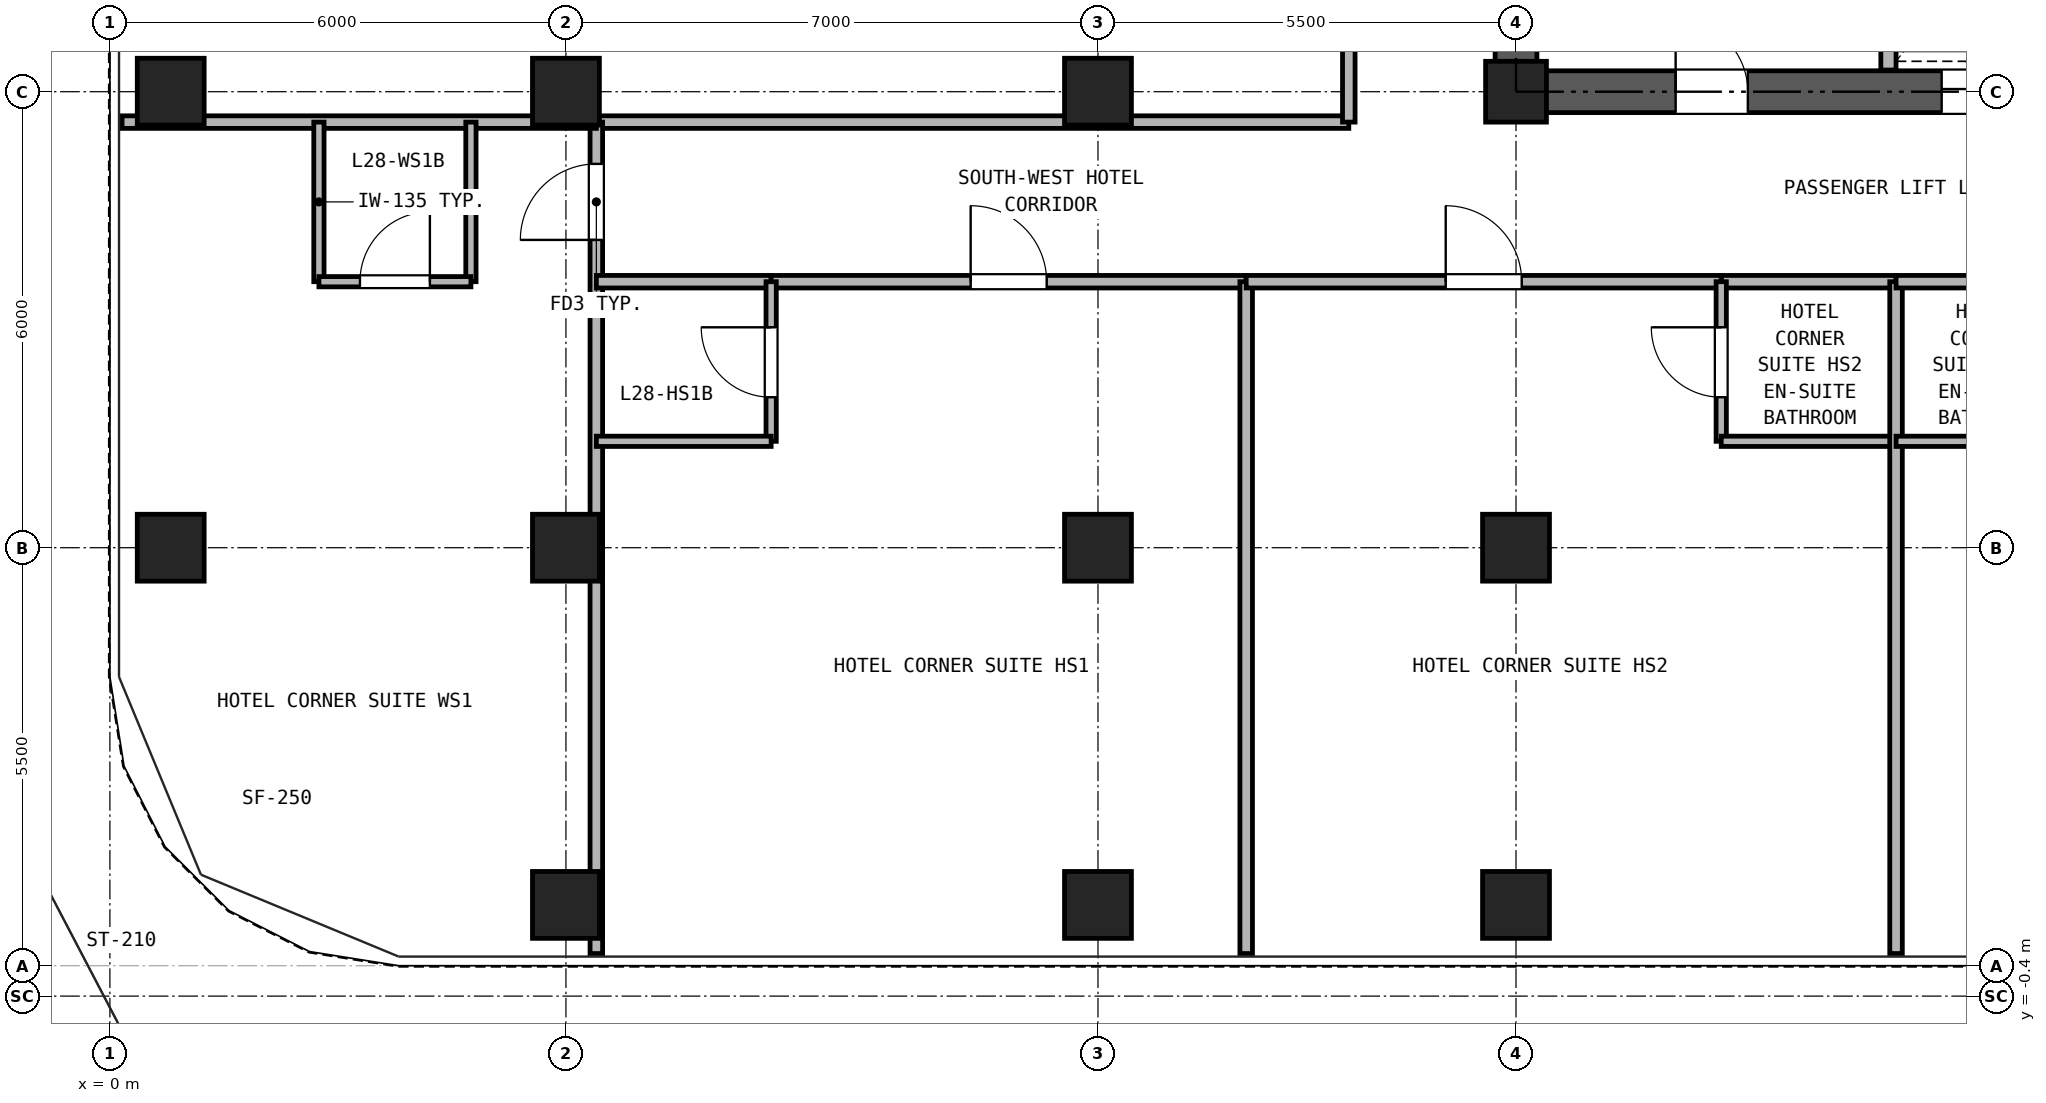
"""IFC4 building model, lengths in metres.
Left out: names, types, materials, properties, quantities, classifications, styles, units other than length and angle.
Written with IfcOpenShell. Run it as: python <this file> out.ifc"""

import sys

from ifc_helpers import new_model, si_unit, direction, frame, frame_2d, origin, origin_2d, place, context, subcontext, project, spatial, rectangle, hollow_rectangle, extrude, source, transform, mapped, element, fill, save


model = new_model("IFC4")
c1 = context("Model", 3, precision=1e-05, world=origin(), true_north=direction((0.0, 1.0)))
c2 = subcontext(c1, "Body", "Model", "MODEL_VIEW")
j1 = project(units=[si_unit("LENGTHUNIT", "METRE"), si_unit("PLANEANGLEUNIT", "RADIAN")], contexts=[c1])
p1 = place(None, origin())
s1 = spatial("IfcSite", under=j1, at=p1, CompositionType="ELEMENT")
p2 = place(p1, origin())
s2 = spatial("IfcBuilding", under=s1, at=p2, CompositionType="ELEMENT")
p3 = place(p2, frame((0.0, 0.0, 105.5)))
s3 = spatial("IfcBuildingStorey", under=s2, at=p3, CompositionType="ELEMENT", Elevation=105.5)
m1 = source(origin(), c2, "Body", "SweptSolid", [
    extrude(hollow_rectangle(XDim=0.88, YDim=0.88, WallThickness=0.05, at=origin_2d()), origin(), (0.0, 0.0, 1.0), 2.95),
])
for number, where, z_axis, x_axis in (
    (1, (6.0, 0.8, 0.0), (0.0, 0.0, 1.0), (1.0, 0.0, 0.0)),
    (2, (13.0, 0.8, 0.0), (0.0, 0.0, 1.0), (1.0, 0.0, 0.0)),
    (3, (18.5, 0.8, 0.0), (0.0, 0.0, 1.0), (1.0, 0.0, 0.0)),
    (4, (0.8, 5.5, 0.0), (0.0, 0.0, 1.0), (1.0, 0.0, 0.0)),
    (5, (0.8, 11.5, 0.0), (0.0, 0.0, 1.0), (1.0, 0.0, 0.0)),
    (6, (6.0, 5.5, 0.0), (0.0, 0.0, 1.0), (1.0, 0.0, 0.0)),
    (7, (6.0, 11.5, 0.0), (0.0, 0.0, 1.0), (1.0, 0.0, 0.0)),
    (8, (13.0, 5.5, 0.0), (0.0, 0.0, 1.0), (1.0, 0.0, 0.0)),
    (9, (13.0, 11.5, 0.0), (0.0, 0.0, 1.0), (1.0, 0.0, 0.0)),
    (10, (18.5, 5.5, 0.0), (0.0, 0.0, 1.0), (1.0, 0.0, 0.0)),
):
    element("IfcColumn", number, at=place(p3, frame(where, z_axis=z_axis, x_axis=x_axis)), inside=s3, PredefinedType="COLUMN", context=c2, shape_type="MappedRepresentation", body=[
        mapped(m1, transform((0.0, 0.0, 0.0), x_axis=(1.0, 0.0, 0.0), y_axis=(0.0, 1.0, 0.0), z_axis=(0.0, 0.0, 1.0), scale=1.0)),
    ])
m2 = source(origin(), c2, "Body", "SweptSolid", [
    extrude(hollow_rectangle(XDim=0.8, YDim=0.8, WallThickness=0.045, at=origin_2d()), origin(), (0.0, 0.0, 1.0), 2.95),
])
p4 = place(p3, frame((18.5, 11.5, 0.0), z_axis=(0.0, 0.0, 1.0), x_axis=(1.0, 0.0, 0.0)))
e11 = element("IfcColumn", 11, at=p4, inside=s3, PredefinedType="COLUMN", context=c2, shape_type="MappedRepresentation", body=[
    mapped(m2, transform((0.0, 0.0, 0.0), x_axis=(1.0, 0.0, 0.0), y_axis=(0.0, 1.0, 0.0), z_axis=(0.0, 0.0, 1.0), scale=1.0)),
])
p5 = place(p3, frame((18.225, 11.5, 0.0), z_axis=(0.0, 0.0, 1.0), x_axis=(1.0, 0.0, 0.0)))
e12 = element("IfcWall", 12, at=p5, inside=s3, PredefinedType="SHEAR", context=c2, shape_type="SweptSolid", body=[
    extrude(rectangle(XDim=10.55, YDim=0.55, at=frame_2d((5.275, 0.0))), origin(), (0.0, 0.0, 1.0), 2.95),
])
p6 = place(p5, frame((2.375, 0.0, 0.0)))
e13 = element("IfcOpeningElement", 13, at=p6, cuts=e12, PredefinedType="OPENING", context=c2, shape_type="SweptSolid", body=[
    extrude(rectangle(XDim=0.95, YDim=2.15, at=frame_2d((0.475, 1.075))), frame((0.0, 0.285, 0.0), z_axis=(0.0, -1.0, 0.0), x_axis=(1.0, 0.0, 0.0)), (0.0, 0.0, 1.0), 0.57),
])
p7 = place(p5, frame((5.875, 0.0, 0.0)))
e14 = element("IfcOpeningElement", 14, at=p7, cuts=e12, PredefinedType="OPENING", context=c2, shape_type="SweptSolid", body=[
    extrude(rectangle(XDim=1.1, YDim=2.25, at=frame_2d((0.55, 1.125))), frame((0.0, 0.285, 0.0), z_axis=(0.0, -1.0, 0.0), x_axis=(1.0, 0.0, 0.0)), (0.0, 0.0, 1.0), 0.57),
])
p8 = place(p5, frame((8.275, 0.0, 0.0)))
e15 = element("IfcOpeningElement", 15, at=p8, cuts=e12, PredefinedType="OPENING", context=c2, shape_type="SweptSolid", body=[
    extrude(rectangle(XDim=1.1, YDim=2.25, at=frame_2d((0.55, 1.125))), frame((0.0, 0.285, 0.0), z_axis=(0.0, -1.0, 0.0), x_axis=(1.0, 0.0, 0.0)), (0.0, 0.0, 1.0), 0.57),
])
p9 = place(p3, frame((18.5, 11.775, 0.0), z_axis=(0.0, 0.0, 1.0), x_axis=(0.0, 1.0, 0.0)))
e16 = element("IfcWall", 16, at=p9, inside=s3, PredefinedType="SHEAR", context=c2, shape_type="SweptSolid", body=[
    extrude(rectangle(XDim=16.7, YDim=0.55, at=frame_2d((8.35, 0.0))), origin(), (0.0, 0.0, 1.0), 2.95),
])
p10 = place(p9, frame((7.375, 0.0, 0.0)))
e17 = element("IfcOpeningElement", 17, at=p10, cuts=e16, PredefinedType="OPENING", context=c2, shape_type="SweptSolid", body=[
    extrude(rectangle(XDim=1.15, YDim=2.2, at=frame_2d((0.575, 1.1))), frame((0.0, 0.285, 0.0), z_axis=(0.0, -1.0, 0.0), x_axis=(1.0, 0.0, 0.0)), (0.0, 0.0, 1.0), 0.57),
])
p11 = place(p3, frame((23.4, 11.785, 0.0), z_axis=(0.0, 0.0, 1.0), x_axis=(0.0, 1.0, 0.0)))
e18 = element("IfcWall", 18, at=p11, inside=s3, PredefinedType="PARTITIONING", context=c2, shape_type="SweptSolid", body=[
    extrude(rectangle(XDim=3.215, YDim=0.2, at=frame_2d((1.607, 0.0))), origin(), (0.0, 0.0, 1.0), 2.95),
])
p12 = place(p3, frame((6.4, 11.1, 0.0), z_axis=(0.0, 0.0, 1.0), x_axis=(1.0, 0.0, 0.0)))
e19 = element("IfcWall", 19, at=p12, inside=s3, PredefinedType="PARTITIONING", context=c2, shape_type="SweptSolid", body=[
    extrude(rectangle(XDim=9.9, YDim=0.165, at=frame_2d((4.95, 0.0))), origin(), (0.0, 0.0, 1.0), 2.95),
])
p13 = place(p3, frame((16.3, 11.1, 0.0), z_axis=(0.0, 0.0, 1.0), x_axis=(0.0, 1.0, 0.0)))
e20 = element("IfcWall", 20, at=p13, inside=s3, PredefinedType="PARTITIONING", context=c2, shape_type="SweptSolid", body=[
    extrude(rectangle(XDim=18.45, YDim=0.165, at=frame_2d((9.225, 0.0))), origin(), (0.0, 0.0, 1.0), 2.95),
])
p14 = place(p13, frame((2.5, 0.0, 0.0)))
e21 = element("IfcOpeningElement", 21, at=p14, cuts=e20, PredefinedType="OPENING", context=c2, shape_type="SweptSolid", body=[
    extrude(rectangle(XDim=0.95, YDim=2.15, at=frame_2d((0.475, 1.075))), frame((0.0, 0.093, 0.0), z_axis=(0.0, -1.0, 0.0), x_axis=(1.0, 0.0, 0.0)), (0.0, 0.0, 1.0), 0.185),
])
p15 = place(p13, frame((8.5, 0.0, 0.0)))
e22 = element("IfcOpeningElement", 22, at=p15, cuts=e20, PredefinedType="OPENING", context=c2, shape_type="SweptSolid", body=[
    extrude(rectangle(XDim=0.95, YDim=2.15, at=frame_2d((0.475, 1.075))), frame((0.0, 0.093, 0.0), z_axis=(0.0, -1.0, 0.0), x_axis=(1.0, 0.0, 0.0)), (0.0, 0.0, 1.0), 0.185),
])
p16 = place(p13, frame((14.725, 0.0, 0.0)))
e23 = element("IfcOpeningElement", 23, at=p16, cuts=e20, PredefinedType="OPENING", context=c2, shape_type="SweptSolid", body=[
    extrude(rectangle(XDim=0.95, YDim=2.15, at=frame_2d((0.475, 1.075))), frame((0.0, 0.093, 0.0), z_axis=(0.0, -1.0, 0.0), x_axis=(1.0, 0.0, 0.0)), (0.0, 0.0, 1.0), 0.185),
])
p17 = place(p3, frame((6.4, 0.16, 0.0), z_axis=(0.0, 0.0, 1.0), x_axis=(0.0, 1.0, 0.0)))
e24 = element("IfcWall", 24, at=p17, inside=s3, PredefinedType="PARTITIONING", context=c2, shape_type="SweptSolid", body=[
    extrude(rectangle(XDim=10.94, YDim=0.165, at=frame_2d((5.47, 0.0))), origin(), (0.0, 0.0, 1.0), 2.95),
])
p18 = place(p17, frame((9.39, 0.0, 0.0)))
e25 = element("IfcOpeningElement", 25, at=p18, cuts=e24, PredefinedType="OPENING", context=c2, shape_type="SweptSolid", body=[
    extrude(rectangle(XDim=1.0, YDim=2.15, at=frame_2d((0.5, 1.075))), frame((0.0, 0.093, 0.0), z_axis=(0.0, -1.0, 0.0), x_axis=(1.0, 0.0, 0.0)), (0.0, 0.0, 1.0), 0.185),
])
p19 = place(p3, frame((0.16, 11.1, 0.0), z_axis=(0.0, 0.0, 1.0), x_axis=(1.0, 0.0, 0.0)))
e26 = element("IfcWall", 26, at=p19, inside=s3, PredefinedType="PARTITIONING", context=c2, shape_type="SweptSolid", body=[
    extrude(rectangle(XDim=6.24, YDim=0.165, at=frame_2d((3.12, 0.0))), origin(), (0.0, 0.0, 1.0), 2.95),
])
for number, where, z_axis, x_axis in (
    (27, (2.75, 9.0, 0.0), (0.0, 0.0, 1.0), (0.0, 1.0, 0.0)),
    (28, (4.75, 9.0, 0.0), (0.0, 0.0, 1.0), (0.0, 1.0, 0.0)),
):
    element("IfcWall", number, at=place(p3, frame(where, z_axis=z_axis, x_axis=x_axis)), inside=s3, PredefinedType="PARTITIONING", context=c2, shape_type="SweptSolid", body=[
        extrude(rectangle(XDim=2.1, YDim=0.135, at=frame_2d((1.05, 0.0))), origin(), (0.0, 0.0, 1.0), 2.95),
    ])
p20 = place(p3, frame((2.75, 9.0, 0.0), z_axis=(0.0, 0.0, 1.0), x_axis=(1.0, 0.0, 0.0)))
e29 = element("IfcWall", 29, at=p20, inside=s3, PredefinedType="PARTITIONING", context=c2, shape_type="SweptSolid", body=[
    extrude(rectangle(XDim=2.0, YDim=0.135, at=frame_2d((1.0, 0.0))), origin(), (0.0, 0.0, 1.0), 2.95),
])
p21 = place(p20, frame((0.54, 0.0, 0.0)))
e30 = element("IfcOpeningElement", 30, at=p21, cuts=e29, PredefinedType="OPENING", context=c2, shape_type="SweptSolid", body=[
    extrude(rectangle(XDim=0.92, YDim=2.1, at=frame_2d((0.46, 1.05))), frame((0.0, 0.077, 0.0), z_axis=(0.0, -1.0, 0.0), x_axis=(1.0, 0.0, 0.0)), (0.0, 0.0, 1.0), 0.155),
])
p22 = place(p3, frame((6.4, 9.0, 0.0), z_axis=(0.0, 0.0, 1.0), x_axis=(1.0, 0.0, 0.0)))
e31 = element("IfcWall", 31, at=p22, inside=s3, PredefinedType="PARTITIONING", context=c2, shape_type="SweptSolid", body=[
    extrude(rectangle(XDim=2.3, YDim=0.165, at=frame_2d((1.15, 0.0))), origin(), (0.0, 0.0, 1.0), 2.95),
])
p23 = place(p3, frame((8.7, 9.0, 0.0), z_axis=(0.0, 0.0, 1.0), x_axis=(1.0, 0.0, 0.0)))
e32 = element("IfcWall", 32, at=p23, inside=s3, PredefinedType="PARTITIONING", context=c2, shape_type="SweptSolid", body=[
    extrude(rectangle(XDim=6.25, YDim=0.165, at=frame_2d((3.125, 0.0))), origin(), (0.0, 0.0, 1.0), 2.95),
])
p24 = place(p23, frame((2.625, 0.0, 0.0)))
e33 = element("IfcOpeningElement", 33, at=p24, cuts=e32, PredefinedType="OPENING", context=c2, shape_type="SweptSolid", body=[
    extrude(rectangle(XDim=1.0, YDim=2.15, at=frame_2d((0.5, 1.075))), frame((0.0, 0.093, 0.0), z_axis=(0.0, -1.0, 0.0), x_axis=(1.0, 0.0, 0.0)), (0.0, 0.0, 1.0), 0.185),
])
p25 = place(p3, frame((8.7, 6.9, 0.0), z_axis=(0.0, 0.0, 1.0), x_axis=(0.0, 1.0, 0.0)))
e34 = element("IfcWall", 34, at=p25, inside=s3, PredefinedType="PARTITIONING", context=c2, shape_type="SweptSolid", body=[
    extrude(rectangle(XDim=2.1, YDim=0.135, at=frame_2d((1.05, 0.0))), origin(), (0.0, 0.0, 1.0), 2.95),
])
p26 = place(p25, frame((0.58, 0.0, 0.0)))
e35 = element("IfcOpeningElement", 35, at=p26, cuts=e34, PredefinedType="OPENING", context=c2, shape_type="SweptSolid", body=[
    extrude(rectangle(XDim=0.92, YDim=2.1, at=frame_2d((0.46, 1.05))), frame((0.0, 0.077, 0.0), z_axis=(0.0, -1.0, 0.0), x_axis=(1.0, 0.0, 0.0)), (0.0, 0.0, 1.0), 0.155),
])
p27 = place(p3, frame((6.4, 6.9, 0.0), z_axis=(0.0, 0.0, 1.0), x_axis=(1.0, 0.0, 0.0)))
e36 = element("IfcWall", 36, at=p27, inside=s3, PredefinedType="PARTITIONING", context=c2, shape_type="SweptSolid", body=[
    extrude(rectangle(XDim=2.3, YDim=0.135, at=frame_2d((1.15, 0.0))), origin(), (0.0, 0.0, 1.0), 2.95),
])
p28 = place(p3, frame((14.95, 0.16, 0.0), z_axis=(0.0, 0.0, 1.0), x_axis=(0.0, 1.0, 0.0)))
e37 = element("IfcWall", 37, at=p28, inside=s3, PredefinedType="PARTITIONING", context=c2, shape_type="SweptSolid", body=[
    extrude(rectangle(XDim=8.84, YDim=0.165, at=frame_2d((4.42, 0.0))), origin(), (0.0, 0.0, 1.0), 2.95),
])
p29 = place(p3, frame((21.2, 9.0, 0.0), z_axis=(0.0, 0.0, 1.0), x_axis=(1.0, 0.0, 0.0)))
e38 = element("IfcWall", 38, at=p29, inside=s3, PredefinedType="PARTITIONING", context=c2, shape_type="SweptSolid", body=[
    extrude(rectangle(XDim=2.3, YDim=0.165, at=frame_2d((1.15, 0.0))), origin(), (0.0, 0.0, 1.0), 2.95),
])
p30 = place(p3, frame((14.95, 9.0, 0.0), z_axis=(0.0, 0.0, 1.0), x_axis=(1.0, 0.0, 0.0)))
e39 = element("IfcWall", 39, at=p30, inside=s3, PredefinedType="PARTITIONING", context=c2, shape_type="SweptSolid", body=[
    extrude(rectangle(XDim=6.25, YDim=0.165, at=frame_2d((3.125, 0.0))), origin(), (0.0, 0.0, 1.0), 2.95),
])
p31 = place(p30, frame((2.625, 0.0, 0.0)))
e40 = element("IfcOpeningElement", 40, at=p31, cuts=e39, PredefinedType="OPENING", context=c2, shape_type="SweptSolid", body=[
    extrude(rectangle(XDim=1.0, YDim=2.15, at=frame_2d((0.5, 1.075))), frame((0.0, 0.093, 0.0), z_axis=(0.0, -1.0, 0.0), x_axis=(1.0, 0.0, 0.0)), (0.0, 0.0, 1.0), 0.185),
])
p32 = place(p3, frame((21.2, 6.9, 0.0), z_axis=(0.0, 0.0, 1.0), x_axis=(0.0, 1.0, 0.0)))
e41 = element("IfcWall", 41, at=p32, inside=s3, PredefinedType="PARTITIONING", context=c2, shape_type="SweptSolid", body=[
    extrude(rectangle(XDim=2.1, YDim=0.135, at=frame_2d((1.05, 0.0))), origin(), (0.0, 0.0, 1.0), 2.95),
])
p33 = place(p32, frame((0.58, 0.0, 0.0)))
e42 = element("IfcOpeningElement", 42, at=p33, cuts=e41, PredefinedType="OPENING", context=c2, shape_type="SweptSolid", body=[
    extrude(rectangle(XDim=0.92, YDim=2.1, at=frame_2d((0.46, 1.05))), frame((0.0, 0.077, 0.0), z_axis=(0.0, -1.0, 0.0), x_axis=(1.0, 0.0, 0.0)), (0.0, 0.0, 1.0), 0.155),
])
p34 = place(p3, frame((21.2, 6.9, 0.0), z_axis=(0.0, 0.0, 1.0), x_axis=(1.0, 0.0, 0.0)))
e43 = element("IfcWall", 43, at=p34, inside=s3, PredefinedType="PARTITIONING", context=c2, shape_type="SweptSolid", body=[
    extrude(rectangle(XDim=2.3, YDim=0.135, at=frame_2d((1.15, 0.0))), origin(), (0.0, 0.0, 1.0), 2.95),
])
p35 = place(p3, frame((23.5, 0.16, 0.0), z_axis=(0.0, 0.0, 1.0), x_axis=(0.0, 1.0, 0.0)))
e44 = element("IfcWall", 44, at=p35, inside=s3, PredefinedType="PARTITIONING", context=c2, shape_type="SweptSolid", body=[
    extrude(rectangle(XDim=8.84, YDim=0.165, at=frame_2d((4.42, 0.0))), origin(), (0.0, 0.0, 1.0), 2.95),
])
p36 = place(p3, frame((23.5, 9.0, 0.0), z_axis=(0.0, 0.0, 1.0), x_axis=(1.0, 0.0, 0.0)))
e45 = element("IfcWall", 45, at=p36, inside=s3, PredefinedType="PARTITIONING", context=c2, shape_type="SweptSolid", body=[
    extrude(rectangle(XDim=2.3, YDim=0.165, at=frame_2d((1.15, 0.0))), origin(), (0.0, 0.0, 1.0), 2.95),
])
p37 = place(p3, frame((23.5, 6.9, 0.0), z_axis=(0.0, 0.0, 1.0), x_axis=(1.0, 0.0, 0.0)))
e46 = element("IfcWall", 46, at=p37, inside=s3, PredefinedType="PARTITIONING", context=c2, shape_type="SweptSolid", body=[
    extrude(rectangle(XDim=2.3, YDim=0.135, at=frame_2d((1.15, 0.0))), origin(), (0.0, 0.0, 1.0), 2.95),
])
p38 = place(p6, frame((0.95, 0.0, 0.0), z_axis=(0.0, 0.0, 1.0), x_axis=(-1.0, 0.0, 0.0)))
e47 = element("IfcDoor", 47, at=p38, inside=s3, OperationType="SINGLE_SWING_LEFT", PredefinedType="DOOR", context=c2, shape_type="SweptSolid", body=[
    extrude(rectangle(XDim=0.95, YDim=2.15, at=frame_2d((0.475, 1.075))), frame((0.0, 0.025, 0.0), z_axis=(0.0, -1.0, 0.0), x_axis=(1.0, 0.0, 0.0)), (0.0, 0.0, 1.0), 0.05),
])
fill(e13, e47)
p39 = place(p7, frame((1.1, 0.0, 0.0), z_axis=(0.0, 0.0, 1.0), x_axis=(-1.0, 0.0, 0.0)))
e48 = element("IfcDoor", 48, at=p39, inside=s3, OperationType="DOUBLE_DOOR_SLIDING", PredefinedType="DOOR", context=c2, shape_type="SweptSolid", body=[
    extrude(rectangle(XDim=1.1, YDim=2.25, at=frame_2d((0.55, 1.125))), frame((0.0, 0.025, 0.0), z_axis=(0.0, -1.0, 0.0), x_axis=(1.0, 0.0, 0.0)), (0.0, 0.0, 1.0), 0.05),
])
fill(e14, e48)
p40 = place(p21, origin())
e49 = element("IfcDoor", 49, at=p40, inside=s3, OperationType="SINGLE_SWING_RIGHT", PredefinedType="DOOR", context=c2, shape_type="SweptSolid", body=[
    extrude(rectangle(XDim=0.92, YDim=2.1, at=frame_2d((0.46, 1.05))), frame((0.0, 0.025, 0.0), z_axis=(0.0, -1.0, 0.0), x_axis=(1.0, 0.0, 0.0)), (0.0, 0.0, 1.0), 0.05),
])
fill(e30, e49)
p41 = place(p18, origin())
e50 = element("IfcDoor", 50, at=p41, inside=s3, OperationType="SINGLE_SWING_LEFT", PredefinedType="DOOR", context=c2, shape_type="SweptSolid", body=[
    extrude(rectangle(XDim=1.0, YDim=2.15, at=frame_2d((0.5, 1.075))), frame((0.0, 0.025, 0.0), z_axis=(0.0, -1.0, 0.0), x_axis=(1.0, 0.0, 0.0)), (0.0, 0.0, 1.0), 0.05),
])
fill(e25, e50)
p42 = place(p26, frame((0.92, 0.0, 0.0), z_axis=(0.0, 0.0, 1.0), x_axis=(-1.0, 0.0, 0.0)))
e51 = element("IfcDoor", 51, at=p42, inside=s3, OperationType="SINGLE_SWING_RIGHT", PredefinedType="DOOR", context=c2, shape_type="SweptSolid", body=[
    extrude(rectangle(XDim=0.92, YDim=2.1, at=frame_2d((0.46, 1.05))), frame((0.0, 0.025, 0.0), z_axis=(0.0, -1.0, 0.0), x_axis=(1.0, 0.0, 0.0)), (0.0, 0.0, 1.0), 0.05),
])
fill(e35, e51)
p43 = place(p24, frame((1.0, 0.0, 0.0), z_axis=(0.0, 0.0, 1.0), x_axis=(-1.0, 0.0, 0.0)))
e52 = element("IfcDoor", 52, at=p43, inside=s3, OperationType="SINGLE_SWING_LEFT", PredefinedType="DOOR", context=c2, shape_type="SweptSolid", body=[
    extrude(rectangle(XDim=1.0, YDim=2.15, at=frame_2d((0.5, 1.075))), frame((0.0, 0.025, 0.0), z_axis=(0.0, -1.0, 0.0), x_axis=(1.0, 0.0, 0.0)), (0.0, 0.0, 1.0), 0.05),
])
fill(e33, e52)
p44 = place(p33, origin())
e53 = element("IfcDoor", 53, at=p44, inside=s3, OperationType="SINGLE_SWING_RIGHT", PredefinedType="DOOR", context=c2, shape_type="SweptSolid", body=[
    extrude(rectangle(XDim=0.92, YDim=2.1, at=frame_2d((0.46, 1.05))), frame((0.0, 0.025, 0.0), z_axis=(0.0, -1.0, 0.0), x_axis=(1.0, 0.0, 0.0)), (0.0, 0.0, 1.0), 0.05),
])
fill(e42, e53)
p45 = place(p31, frame((1.0, 0.0, 0.0), z_axis=(0.0, 0.0, 1.0), x_axis=(-1.0, 0.0, 0.0)))
e54 = element("IfcDoor", 54, at=p45, inside=s3, OperationType="SINGLE_SWING_LEFT", PredefinedType="DOOR", context=c2, shape_type="SweptSolid", body=[
    extrude(rectangle(XDim=1.0, YDim=2.15, at=frame_2d((0.5, 1.075))), frame((0.0, 0.025, 0.0), z_axis=(0.0, -1.0, 0.0), x_axis=(1.0, 0.0, 0.0)), (0.0, 0.0, 1.0), 0.05),
])
fill(e40, e54)
save(model, sys.argv[1])
